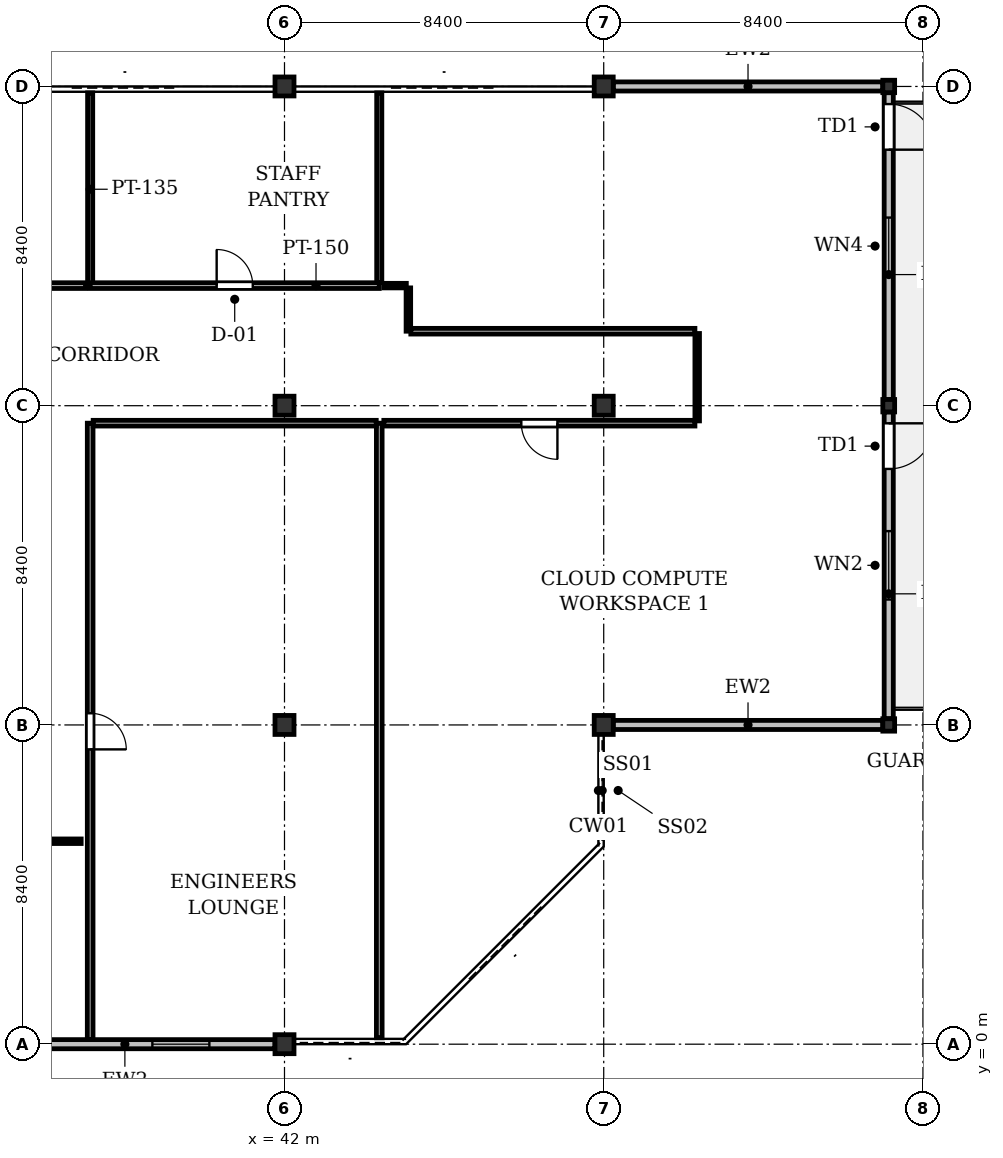
"""IFC4 building model, lengths in metres.
Left out: names, types, materials, properties, quantities, classifications, styles, units other than length and angle.
Written with IfcOpenShell. Run it as: python <this file> out.ifc"""

import sys

from ifc_helpers import new_model, si_unit, direction, frame, frame_2d, origin, origin_2d, place, context, subcontext, project, spatial, rectangle, i_section, extrude, element, fill, save


model = new_model("IFC4")
c1 = context("Model", 3, precision=1e-05, world=origin(), true_north=direction((0.0, 1.0)))
c2 = subcontext(c1, "Body", "Model", "MODEL_VIEW")
j1 = project(units=[si_unit("LENGTHUNIT", "METRE"), si_unit("PLANEANGLEUNIT", "RADIAN")], contexts=[c1])
p1 = place(None, origin())
s1 = spatial("IfcSite", under=j1, at=p1, CompositionType="ELEMENT")
p2 = place(p1, origin())
s2 = spatial("IfcBuilding", under=s1, at=p2, CompositionType="ELEMENT")
p3 = place(p2, frame((0.0, 0.0, 62.6)))
s3 = spatial("IfcBuildingStorey", under=s2, at=p3, CompositionType="ELEMENT", Elevation=62.6)
for number, where, z_axis, x_axis in (
    (1, (42.0, 0.0, 0.0), (0.0, 0.0, 1.0), (1.0, 0.0, 0.0)),
    (2, (42.0, 8.4, 0.0), (0.0, 0.0, 1.0), (1.0, 0.0, 0.0)),
    (3, (42.0, 16.8, 0.0), (0.0, 0.0, 1.0), (1.0, 0.0, 0.0)),
    (4, (42.0, 25.2, 0.0), (0.0, 0.0, 1.0), (1.0, 0.0, 0.0)),
    (5, (50.4, 8.4, 0.0), (0.0, 0.0, 1.0), (1.0, 0.0, 0.0)),
    (6, (50.4, 16.8, 0.0), (0.0, 0.0, 1.0), (1.0, 0.0, 0.0)),
    (7, (50.4, 25.2, 0.0), (0.0, 0.0, 1.0), (1.0, 0.0, 0.0)),
):
    element("IfcColumn", number, at=place(p3, frame(where, z_axis=z_axis, x_axis=x_axis)), inside=s3, PredefinedType="COLUMN", context=c2, shape_type="SweptSolid", body=[
        extrude(i_section(OverallWidth=0.5, OverallDepth=0.5, WebThickness=0.028, FlangeThickness=0.04, at=origin_2d()), origin(), (0.0, 0.0, 1.0), 4.2),
    ])
for number, where, z_axis, x_axis in (
    (8, (57.9, 8.4, 0.0), (0.0, 0.0, 1.0), (1.0, 0.0, 0.0)),
    (9, (57.9, 16.8, 0.0), (0.0, 0.0, 1.0), (1.0, 0.0, 0.0)),
    (10, (57.9, 25.2, 0.0), (0.0, 0.0, 1.0), (1.0, 0.0, 0.0)),
):
    element("IfcColumn", number, at=place(p3, frame(where, z_axis=z_axis, x_axis=x_axis)), inside=s3, PredefinedType="COLUMN", context=c2, shape_type="SweptSolid", body=[
        extrude(i_section(OverallWidth=0.311, OverallDepth=0.327, WebThickness=0.016, FlangeThickness=0.025, FilletRadius=0.017, at=origin_2d()), origin(), (0.0, 0.0, 1.0), 4.2),
    ])
p4 = place(p3, frame((57.9, 25.037, 0.0), z_axis=(0.0, 0.0, 1.0), x_axis=(0.0, -1.0, 0.0)))
e11 = element("IfcWall", 11, at=p4, inside=s3, PredefinedType="STANDARD", context=c2, shape_type="SweptSolid", body=[
    extrude(rectangle(XDim=8.073, YDim=0.24, at=frame_2d((4.037, 0.0))), origin(), (0.0, 0.0, 1.0), 3.522),
])
p5 = place(p4, frame((0.3, 0.0, 0.0)))
e12 = element("IfcOpeningElement", 12, at=p5, cuts=e11, PredefinedType="OPENING", context=c2, shape_type="SweptSolid", body=[
    extrude(rectangle(XDim=1.2, YDim=2.2, at=frame_2d((0.6, 1.1))), frame((0.0, 0.13, 0.0), z_axis=(0.0, -1.0, 0.0), x_axis=(1.0, 0.0, 0.0)), (0.0, 0.0, 1.0), 0.26),
])
p6 = place(p4, frame((3.287, 0.0, 0.9)))
e13 = element("IfcOpeningElement", 13, at=p6, cuts=e11, PredefinedType="OPENING", context=c2, shape_type="SweptSolid", body=[
    extrude(rectangle(XDim=1.5, YDim=1.6, at=frame_2d((0.75, 0.8))), frame((0.0, 0.13, 0.0), z_axis=(0.0, -1.0, 0.0), x_axis=(1.0, 0.0, 0.0)), (0.0, 0.0, 1.0), 0.26),
])
p7 = place(p3, frame((57.9, 16.636, 0.0), z_axis=(0.0, 0.0, 1.0), x_axis=(0.0, -1.0, 0.0)))
e14 = element("IfcWall", 14, at=p7, inside=s3, PredefinedType="STANDARD", context=c2, shape_type="SweptSolid", body=[
    extrude(rectangle(XDim=8.073, YDim=0.24, at=frame_2d((4.037, 0.0))), origin(), (0.0, 0.0, 1.0), 3.522),
])
p8 = place(p7, frame((0.3, 0.0, 0.0)))
e15 = element("IfcOpeningElement", 15, at=p8, cuts=e14, PredefinedType="OPENING", context=c2, shape_type="SweptSolid", body=[
    extrude(rectangle(XDim=1.2, YDim=2.2, at=frame_2d((0.6, 1.1))), frame((0.0, 0.13, 0.0), z_axis=(0.0, -1.0, 0.0), x_axis=(1.0, 0.0, 0.0)), (0.0, 0.0, 1.0), 0.26),
])
p9 = place(p7, frame((3.136, 0.0, 0.9)))
e16 = element("IfcOpeningElement", 16, at=p9, cuts=e14, PredefinedType="OPENING", context=c2, shape_type="SweptSolid", body=[
    extrude(rectangle(XDim=1.8, YDim=1.6, at=frame_2d((0.9, 0.8))), frame((0.0, 0.13, 0.0), z_axis=(0.0, -1.0, 0.0), x_axis=(1.0, 0.0, 0.0)), (0.0, 0.0, 1.0), 0.26),
])
p10 = place(p3, frame((57.744, 8.4, 0.0), z_axis=(0.0, 0.0, 1.0), x_axis=(-1.0, 0.0, 0.0)))
e17 = element("IfcWall", 17, at=p10, inside=s3, PredefinedType="STANDARD", context=c2, shape_type="SweptSolid", body=[
    extrude(rectangle(XDim=7.094, YDim=0.24, at=frame_2d((3.547, 0.0))), origin(), (0.0, 0.0, 1.0), 3.015),
])
p11 = place(p3, frame((41.75, 0.0, 0.0), z_axis=(0.0, 0.0, 1.0), x_axis=(-1.0, 0.0, 0.0)))
e18 = element("IfcWall", 18, at=p11, inside=s3, PredefinedType="STANDARD", context=c2, shape_type="SweptSolid", body=[
    extrude(rectangle(XDim=7.9, YDim=0.24, at=frame_2d((3.95, 0.0))), origin(), (0.0, 0.0, 1.0), 3.471),
])
p12 = place(p11, frame((1.727, 0.0, 0.9)))
e19 = element("IfcOpeningElement", 19, at=p12, cuts=e18, PredefinedType="OPENING", context=c2, shape_type="SweptSolid", body=[
    extrude(rectangle(XDim=1.5, YDim=1.6, at=frame_2d((0.75, 0.8))), frame((0.0, 0.13, 0.0), z_axis=(0.0, -1.0, 0.0), x_axis=(1.0, 0.0, 0.0)), (0.0, 0.0, 1.0), 0.26),
])
p13 = place(p3, frame((50.65, 25.2, 0.0), z_axis=(0.0, 0.0, 1.0), x_axis=(1.0, 0.0, 0.0)))
e20 = element("IfcWall", 20, at=p13, inside=s3, PredefinedType="STANDARD", context=c2, shape_type="SweptSolid", body=[
    extrude(rectangle(XDim=7.094, YDim=0.24, at=frame_2d((3.547, 0.0))), origin(), (0.0, 0.0, 1.0), 3.015),
])
p14 = place(p3, frame((36.886, 25.031, 0.0), z_axis=(0.0, 0.0, 1.0), x_axis=(0.0, -1.0, 0.0)))
e21 = element("IfcWall", 21, at=p14, inside=s3, PredefinedType="PARTITIONING", context=c2, shape_type="SweptSolid", body=[
    extrude(rectangle(XDim=5.071, YDim=0.135, at=frame_2d((2.536, 0.0))), origin(), (0.0, 0.0, 1.0), 3.925),
])
p15 = place(p3, frame((36.886, 19.96, 0.0), z_axis=(0.0, 0.0, 1.0), x_axis=(1.0, 0.0, 0.0)))
e22 = element("IfcWall", 22, at=p15, inside=s3, PredefinedType="PARTITIONING", context=c2, shape_type="SweptSolid", body=[
    extrude(rectangle(XDim=7.607, YDim=0.15, at=frame_2d((3.804, 0.0))), origin(), (0.0, 0.0, 1.0), 3.323),
])
p16 = place(p15, frame((3.329, 0.0, 0.0)))
e23 = element("IfcOpeningElement", 23, at=p16, cuts=e22, PredefinedType="OPENING", context=c2, shape_type="SweptSolid", body=[
    extrude(rectangle(XDim=0.95, YDim=2.15, at=frame_2d((0.475, 1.075))), frame((0.0, 0.085, 0.0), z_axis=(0.0, -1.0, 0.0), x_axis=(1.0, 0.0, 0.0)), (0.0, 0.0, 1.0), 0.17),
])
p17 = place(p3, frame((44.494, 20.039, 0.0), z_axis=(0.0, 0.0, 1.0), x_axis=(0.0, 1.0, 0.0)))
e24 = element("IfcWall", 24, at=p17, inside=s3, PredefinedType="PARTITIONING", context=c2, shape_type="SweptSolid", body=[
    extrude(rectangle(XDim=4.992, YDim=0.135, at=frame_2d((2.496, 0.0))), origin(), (0.0, 0.0, 1.0), 3.925),
])
p18 = place(p3, frame((36.886, 16.34, 0.0), z_axis=(0.0, 0.0, 1.0), x_axis=(0.0, -1.0, 0.0)))
e25 = element("IfcWall", 25, at=p18, inside=s3, PredefinedType="PARTITIONING", context=c2, shape_type="SweptSolid", body=[
    extrude(rectangle(XDim=16.216, YDim=0.15, at=frame_2d((8.108, 0.0))), origin(), (0.0, 0.0, 1.0), 3.313),
])
p19 = place(p18, frame((7.633, 0.0, 0.0)))
e26 = element("IfcOpeningElement", 26, at=p19, cuts=e25, PredefinedType="OPENING", context=c2, shape_type="SweptSolid", body=[
    extrude(rectangle(XDim=0.95, YDim=2.15, at=frame_2d((0.475, 1.075))), frame((0.0, 0.085, 0.0), z_axis=(0.0, -1.0, 0.0), x_axis=(1.0, 0.0, 0.0)), (0.0, 0.0, 1.0), 0.17),
])
p20 = place(p3, frame((44.494, 0.169, 0.0), z_axis=(0.0, 0.0, 1.0), x_axis=(0.0, 1.0, 0.0)))
e27 = element("IfcWall", 27, at=p20, inside=s3, PredefinedType="PARTITIONING", context=c2, shape_type="SweptSolid", body=[
    extrude(rectangle(XDim=16.171, YDim=0.15, at=frame_2d((8.085, 0.0))), origin(), (0.0, 0.0, 1.0), 3.313),
])
p21 = place(p3, frame((44.415, 16.34, 0.0), z_axis=(0.0, 0.0, 1.0), x_axis=(-1.0, 0.0, 0.0)))
e28 = element("IfcWall", 28, at=p21, inside=s3, PredefinedType="PARTITIONING", context=c2, shape_type="SweptSolid", body=[
    extrude(rectangle(XDim=7.449, YDim=0.15, at=frame_2d((3.725, 0.0))), origin(), (0.0, 0.0, 1.0), 3.323),
])
p22 = place(p3, frame((22.026, 19.96, 0.0), z_axis=(0.0, 0.0, 1.0), x_axis=(0.999999999863, -1.6562598e-05, 0.0)))
e29 = element("IfcWall", 29, at=p22, inside=s3, PredefinedType="PARTITIONING", context=c2, shape_type="SweptSolid", body=[
    extrude(rectangle(XDim=14.74, YDim=0.15, at=frame_2d((7.37, 0.0))), origin(), (0.0, 0.0, 1.0), 3.323),
])
p23 = place(p22, frame((6.895, 0.0, 0.0)))
e30 = element("IfcOpeningElement", 30, at=p23, cuts=e29, PredefinedType="OPENING", context=c2, shape_type="SweptSolid", body=[
    extrude(rectangle(XDim=0.95, YDim=2.15, at=frame_2d((0.475, 1.075))), frame((0.0, 0.085, 0.0), z_axis=(0.0, -1.0, 0.0), x_axis=(1.0, 0.0, 0.0)), (0.0, 0.0, 1.0), 0.17),
])
p24 = place(p3, frame((36.65, 5.34, 0.0), z_axis=(0.0, 0.0, 1.0), x_axis=(-1.0, 0.0, 0.0)))
e31 = element("IfcWall", 31, at=p24, inside=s3, PredefinedType="PARTITIONING", context=c2, shape_type="SweptSolid", body=[
    extrude(rectangle(XDim=2.25, YDim=0.12, at=frame_2d((1.125, 0.0))), origin(), (0.0, 0.0, 1.0), 3.925),
])
p25 = place(p3, frame((44.614, 19.96, 0.0), z_axis=(0.0, 0.0, 1.0), x_axis=(1.0, 0.0, 0.0)))
e32 = element("IfcWall", 32, at=p25, inside=s3, PredefinedType="PARTITIONING", context=c2, shape_type="SweptSolid", body=[
    extrude(rectangle(XDim=0.592, YDim=0.12, at=frame_2d((0.296, 0.0))), origin(), (0.0, 0.0, 1.0), 3.925),
])
p26 = place(p3, frame((45.26, 19.9, 0.0), z_axis=(0.0, 0.0, 1.0), x_axis=(0.0, -1.0, 0.0)))
e33 = element("IfcWall", 33, at=p26, inside=s3, PredefinedType="PARTITIONING", context=c2, shape_type="SweptSolid", body=[
    extrude(rectangle(XDim=1.14, YDim=0.12, at=frame_2d((0.57, 0.0))), origin(), (0.0, 0.0, 1.0), 3.925),
])
p27 = place(p3, frame((45.324, 18.76, 0.0), z_axis=(0.0, 0.0, 1.0), x_axis=(1.0, 0.0, 0.0)))
e34 = element("IfcWall", 34, at=p27, inside=s3, PredefinedType="PARTITIONING", context=c2, shape_type="SweptSolid", body=[
    extrude(rectangle(XDim=7.476, YDim=0.15, at=frame_2d((3.738, 0.0))), origin(), (0.0, 0.0, 1.0), 3.323),
])
p28 = place(p3, frame((52.86, 18.7, 0.0), z_axis=(0.0, 0.0, 1.0), x_axis=(0.0, -1.0, 0.0)))
e35 = element("IfcWall", 35, at=p28, inside=s3, PredefinedType="PARTITIONING", context=c2, shape_type="SweptSolid", body=[
    extrude(rectangle(XDim=2.3, YDim=0.12, at=frame_2d((1.15, 0.0))), origin(), (0.0, 0.0, 1.0), 3.015),
])
p29 = place(p3, frame((52.8, 16.34, 0.0), z_axis=(0.0, 0.0, 1.0), x_axis=(-1.0, 0.0, 0.0)))
e36 = element("IfcWall", 36, at=p29, inside=s3, PredefinedType="PARTITIONING", context=c2, shape_type="SweptSolid", body=[
    extrude(rectangle(XDim=8.186, YDim=0.15, at=frame_2d((4.093, 0.0))), origin(), (0.0, 0.0, 1.0), 3.323),
])
p30 = place(p29, frame((3.618, 0.0, 0.0)))
e37 = element("IfcOpeningElement", 37, at=p30, cuts=e36, PredefinedType="OPENING", context=c2, shape_type="SweptSolid", body=[
    extrude(rectangle(XDim=0.95, YDim=2.15, at=frame_2d((0.475, 1.075))), frame((0.0, 0.085, 0.0), z_axis=(0.0, -1.0, 0.0), x_axis=(1.0, 0.0, 0.0)), (0.0, 0.0, 1.0), 0.17),
])
p31 = place(p5, origin())
e38 = element("IfcDoor", 38, at=p31, inside=s3, OperationType="SINGLE_SWING_RIGHT", PredefinedType="DOOR", context=c2, shape_type="SweptSolid", body=[
    extrude(rectangle(XDim=1.2, YDim=2.2, at=frame_2d((0.6, 1.1))), frame((0.0, 0.025, 0.0), z_axis=(0.0, -1.0, 0.0), x_axis=(1.0, 0.0, 0.0)), (0.0, 0.0, 1.0), 0.05),
])
fill(e12, e38)
p32 = place(p6, origin())
e39 = element("IfcWindow", 39, at=p32, inside=s3, PartitioningType="SINGLE_PANEL", PredefinedType="WINDOW", context=c2, shape_type="SweptSolid", body=[
    extrude(rectangle(XDim=1.5, YDim=1.6, at=frame_2d((0.75, 0.8))), frame((0.0, 0.03, 0.0), z_axis=(0.0, -1.0, 0.0), x_axis=(1.0, 0.0, 0.0)), (0.0, 0.0, 1.0), 0.06),
])
fill(e13, e39)
p33 = place(p8, origin())
e40 = element("IfcDoor", 40, at=p33, inside=s3, OperationType="SINGLE_SWING_LEFT", PredefinedType="DOOR", context=c2, shape_type="SweptSolid", body=[
    extrude(rectangle(XDim=1.2, YDim=2.2, at=frame_2d((0.6, 1.1))), frame((0.0, 0.025, 0.0), z_axis=(0.0, -1.0, 0.0), x_axis=(1.0, 0.0, 0.0)), (0.0, 0.0, 1.0), 0.05),
])
fill(e15, e40)
p34 = place(p9, origin())
e41 = element("IfcWindow", 41, at=p34, inside=s3, PartitioningType="SINGLE_PANEL", PredefinedType="WINDOW", context=c2, shape_type="SweptSolid", body=[
    extrude(rectangle(XDim=1.8, YDim=1.6, at=frame_2d((0.9, 0.8))), frame((0.0, 0.03, 0.0), z_axis=(0.0, -1.0, 0.0), x_axis=(1.0, 0.0, 0.0)), (0.0, 0.0, 1.0), 0.06),
])
fill(e16, e41)
p35 = place(p12, origin())
e42 = element("IfcWindow", 42, at=p35, inside=s3, PartitioningType="SINGLE_PANEL", PredefinedType="WINDOW", context=c2, shape_type="SweptSolid", body=[
    extrude(rectangle(XDim=1.5, YDim=1.6, at=frame_2d((0.75, 0.8))), frame((0.0, 0.03, 0.0), z_axis=(0.0, -1.0, 0.0), x_axis=(1.0, 0.0, 0.0)), (0.0, 0.0, 1.0), 0.06),
])
fill(e19, e42)
p36 = place(p16, origin())
e43 = element("IfcDoor", 43, at=p36, inside=s3, OperationType="SINGLE_SWING_LEFT", PredefinedType="DOOR", context=c2, shape_type="SweptSolid", body=[
    extrude(rectangle(XDim=0.95, YDim=2.15, at=frame_2d((0.475, 1.075))), frame((0.0, 0.025, 0.0), z_axis=(0.0, -1.0, 0.0), x_axis=(1.0, 0.0, 0.0)), (0.0, 0.0, 1.0), 0.05),
])
fill(e23, e43)
p37 = place(p19, origin())
e44 = element("IfcDoor", 44, at=p37, inside=s3, OperationType="SINGLE_SWING_RIGHT", PredefinedType="DOOR", context=c2, shape_type="SweptSolid", body=[
    extrude(rectangle(XDim=0.95, YDim=2.15, at=frame_2d((0.475, 1.075))), frame((0.0, 0.025, 0.0), z_axis=(0.0, -1.0, 0.0), x_axis=(1.0, 0.0, 0.0)), (0.0, 0.0, 1.0), 0.05),
])
fill(e26, e44)
p38 = place(p30, origin())
e45 = element("IfcDoor", 45, at=p38, inside=s3, OperationType="SINGLE_SWING_LEFT", PredefinedType="DOOR", context=c2, shape_type="SweptSolid", body=[
    extrude(rectangle(XDim=0.95, YDim=2.15, at=frame_2d((0.475, 1.075))), frame((0.0, 0.025, 0.0), z_axis=(0.0, -1.0, 0.0), x_axis=(1.0, 0.0, 0.0)), (0.0, 0.0, 1.0), 0.05),
])
fill(e37, e45)
save(model, sys.argv[1])
